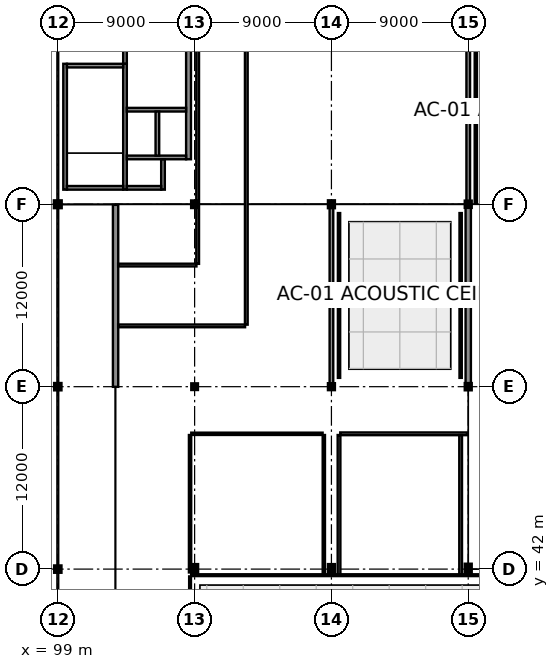
"""IFC4 building model, lengths in metres.
Left out: names, types, materials, properties, quantities, classifications, styles, units other than length and angle.
Written with IfcOpenShell. Run it as: python <this file> out.ifc"""

import sys

from ifc_helpers import new_model, si_unit, direction, frame, frame_2d, origin, origin_2d, place, context, subcontext, project, spatial, rectangle, hollow_circle, i_section, extrude, element, fill, save


model = new_model("IFC4")
c1 = context("Model", 3, precision=1e-05, world=origin(), true_north=direction((0.0, 1.0)))
c2 = subcontext(c1, "Body", "Model", "MODEL_VIEW")
j1 = project(units=[si_unit("LENGTHUNIT", "METRE"), si_unit("PLANEANGLEUNIT", "RADIAN")], contexts=[c1])
p1 = place(None, origin())
s1 = spatial("IfcSite", under=j1, at=p1, CompositionType="ELEMENT")
p2 = place(p1, origin())
s2 = spatial("IfcBuilding", under=s1, at=p2, CompositionType="ELEMENT")
p3 = place(p2, origin())
s3 = spatial("IfcBuildingStorey", under=s2, at=p3, CompositionType="ELEMENT", Elevation=0.0)
for number, where, z_axis, x_axis in (
    (1, (99.0, 42.0, 0.0), (0.0, 0.0, 1.0), (1.0, 0.0, 0.0)),
    (2, (99.0, 54.0, 0.0), (0.0, 0.0, 1.0), (1.0, 0.0, 0.0)),
):
    element("IfcColumn", number, at=place(p3, frame(where, z_axis=z_axis, x_axis=x_axis)), inside=s3, PredefinedType="PILASTER", context=c2, shape_type="SweptSolid", body=[
        extrude(hollow_circle(Radius=0.162, WallThickness=0.012, at=origin_2d()), origin(), (0.0, 0.0, 1.0), 5.4),
    ])
p4 = place(p3, frame((99.0, 66.0, 0.0), z_axis=(0.0, 0.0, 1.0), x_axis=(1.0, 0.0, 0.0)))
e3 = element("IfcColumn", 3, at=p4, inside=s3, PredefinedType="PILASTER", context=c2, shape_type="SweptSolid", body=[
    extrude(hollow_circle(Radius=0.178, WallThickness=0.016, at=origin_2d()), origin(), (0.0, 0.0, 1.0), 5.4),
])
p5 = place(p3, frame((108.0, 42.0, 0.0), z_axis=(0.0, 0.0, 1.0), x_axis=(1.0, 0.0, 0.0)))
e4 = element("IfcColumn", 4, at=p5, inside=s3, PredefinedType="COLUMN", context=c2, shape_type="SweptSolid", body=[
    extrude(i_section(OverallWidth=0.3, OverallDepth=0.5, WebThickness=0.014, FlangeThickness=0.028, at=origin_2d()), origin(), (0.0, 0.0, 1.0), 5.4),
])
p6 = place(p3, frame((108.0, 54.0, 0.0), z_axis=(0.0, 0.0, 1.0), x_axis=(1.0, 0.0, 0.0)))
e5 = element("IfcColumn", 5, at=p6, inside=s3, PredefinedType="COLUMN", context=c2, shape_type="SweptSolid", body=[
    extrude(i_section(OverallWidth=0.28, OverallDepth=0.28, WebThickness=0.01, FlangeThickness=0.018, at=origin_2d()), origin(), (0.0, 0.0, 1.0), 5.4),
])
p7 = place(p3, frame((108.0, 66.0, 0.0), z_axis=(0.0, 0.0, 1.0), x_axis=(1.0, 0.0, 0.0)))
e6 = element("IfcColumn", 6, at=p7, inside=s3, PredefinedType="COLUMN", context=c2, shape_type="SweptSolid", body=[
    extrude(i_section(OverallWidth=0.3, OverallDepth=0.34, WebThickness=0.012, FlangeThickness=0.021, at=origin_2d()), origin(), (0.0, 0.0, 1.0), 5.4),
])
p8 = place(p3, frame((117.0, 42.0, 0.0), z_axis=(0.0, 0.0, 1.0), x_axis=(0.0, 1.0, 0.0)))
e7 = element("IfcColumn", 7, at=p8, inside=s3, PredefinedType="COLUMN", context=c2, shape_type="SweptSolid", body=[
    extrude(i_section(OverallWidth=0.3, OverallDepth=0.5, WebThickness=0.014, FlangeThickness=0.028, at=origin_2d()), origin(), (0.0, 0.0, 1.0), 5.4),
])
p9 = place(p3, frame((117.0, 54.0, 0.0), z_axis=(0.0, 0.0, 1.0), x_axis=(1.0, 0.0, 0.0)))
e8 = element("IfcColumn", 8, at=p9, inside=s3, PredefinedType="COLUMN", context=c2, shape_type="SweptSolid", body=[
    extrude(i_section(OverallWidth=0.3, OverallDepth=0.3, WebThickness=0.011, FlangeThickness=0.019, at=origin_2d()), origin(), (0.0, 0.0, 1.0), 5.4),
])
p10 = place(p3, frame((117.0, 66.0, 0.0), z_axis=(0.0, 0.0, 1.0), x_axis=(1.0, 0.0, 0.0)))
e9 = element("IfcColumn", 9, at=p10, inside=s3, PredefinedType="COLUMN", context=c2, shape_type="SweptSolid", body=[
    extrude(i_section(OverallWidth=0.3, OverallDepth=0.36, WebThickness=0.012, FlangeThickness=0.022, at=origin_2d()), origin(), (0.0, 0.0, 1.0), 5.4),
])
p11 = place(p3, frame((126.0, 42.0, 0.0), z_axis=(0.0, 0.0, 1.0), x_axis=(1.0, 0.0, 0.0)))
e10 = element("IfcColumn", 10, at=p11, inside=s3, PredefinedType="COLUMN", context=c2, shape_type="SweptSolid", body=[
    extrude(i_section(OverallWidth=0.3, OverallDepth=0.55, WebThickness=0.015, FlangeThickness=0.029, at=origin_2d()), origin(), (0.0, 0.0, 1.0), 5.4),
])
for number, where, z_axis, x_axis in (
    (11, (126.0, 54.0, 0.0), (0.0, 0.0, 1.0), (1.0, 0.0, 0.0)),
    (12, (126.0, 66.0, 0.0), (0.0, 0.0, 1.0), (0.0, 1.0, 0.0)),
):
    element("IfcColumn", number, at=place(p3, frame(where, z_axis=z_axis, x_axis=x_axis)), inside=s3, PredefinedType="COLUMN", context=c2, shape_type="SweptSolid", body=[
        extrude(i_section(OverallWidth=0.3, OverallDepth=0.32, WebThickness=0.011, FlangeThickness=0.021, at=origin_2d()), origin(), (0.0, 0.0, 1.0), 5.4),
    ])
p12 = place(p3, frame((126.0, 54.158, 0.0), z_axis=(0.0, 0.0, 1.0), x_axis=(0.0, 1.0, 0.0)))
e13 = element("IfcWall", 13, at=p12, inside=s3, PredefinedType="SOLIDWALL", context=c2, shape_type="SweptSolid", body=[
    extrude(rectangle(XDim=11.834, YDim=0.35, at=frame_2d((5.917, 0.0))), origin(), (0.0, 0.0, 1.0), 4.605),
])
p13 = place(p3, frame((102.8, 65.96, 0.0), z_axis=(0.0, 0.0, 1.0), x_axis=(0.0, -1.0, 0.0)))
e14 = element("IfcWall", 14, at=p13, inside=s3, PredefinedType="SOLIDWALL", context=c2, shape_type="SweptSolid", body=[
    extrude(rectangle(XDim=11.97, YDim=0.35, at=frame_2d((5.985, 0.0))), origin(), (0.0, 0.0, 1.0), 5.08),
])
p14 = place(p13, frame((4.96, 0.0, 0.0)))
e15 = element("IfcOpeningElement", 15, at=p14, cuts=e14, PredefinedType="OPENING", context=c2, shape_type="SweptSolid", body=[
    extrude(rectangle(XDim=2.0, YDim=2.5, at=frame_2d((1.0, 1.25))), frame((0.0, 0.19, 0.0), z_axis=(0.0, -1.0, 0.0), x_axis=(1.0, 0.0, 0.0)), (0.0, 0.0, 1.0), 0.38),
])
p15 = place(p3, frame((99.48, 66.96, 0.0), z_axis=(0.0, 0.0, 1.0), x_axis=(0.0, 1.0, 0.0)))
e16 = element("IfcWall", 16, at=p15, inside=s3, PredefinedType="SHEAR", context=c2, shape_type="SweptSolid", body=[
    extrude(rectangle(XDim=8.28, YDim=0.24, at=frame_2d((4.14, 0.0))), origin(), (0.0, 0.0, 1.0), 5.21),
])
p16 = place(p3, frame((103.42, 66.96, 0.0), z_axis=(0.0, 0.0, 1.0), x_axis=(0.0, 1.0, 0.0)))
e17 = element("IfcWall", 17, at=p16, inside=s3, PredefinedType="SHEAR", context=c2, shape_type="SweptSolid", body=[
    extrude(rectangle(XDim=8.28, YDim=0.24, at=frame_2d((4.14, 0.0))), origin(), (0.0, 0.0, 1.0), 5.21),
])
p17 = place(p16, frame((6.49, 0.0, 0.0)))
e18 = element("IfcOpeningElement", 18, at=p17, cuts=e17, PredefinedType="OPENING", context=c2, shape_type="SweptSolid", body=[
    extrude(rectangle(XDim=1.3, YDim=2.2, at=frame_2d((0.65, 1.1))), frame((0.0, 0.135, 0.0), z_axis=(0.0, -1.0, 0.0), x_axis=(1.0, 0.0, 0.0)), (0.0, 0.0, 1.0), 0.27),
])
for number, where, z_axis, x_axis in (
    (19, (99.6, 67.08, 0.0), (0.0, 0.0, 1.0), (1.0, 0.0, 0.0)),
    (20, (99.6, 75.12, 0.0), (0.0, 0.0, 1.0), (1.0, 0.0, 0.0)),
):
    element("IfcWall", number, at=place(p3, frame(where, z_axis=z_axis, x_axis=x_axis)), inside=s3, PredefinedType="SHEAR", context=c2, shape_type="SweptSolid", body=[
        extrude(rectangle(XDim=3.7, YDim=0.24, at=frame_2d((1.85, 0.0))), origin(), (0.0, 0.0, 1.0), 5.21),
    ])
p18 = place(p3, frame((103.42, 75.24, 0.0), z_axis=(0.0, 0.0, 1.0), x_axis=(0.0, 1.0, 0.0)))
e21 = element("IfcWall", 21, at=p18, inside=s3, PredefinedType="SHEAR", context=c2, shape_type="SweptSolid", body=[
    extrude(rectangle(XDim=2.76, YDim=0.24, at=frame_2d((1.38, 0.0))), origin(), (0.0, 0.0, 1.0), 5.06),
])
p19 = place(p3, frame((107.6, 68.96, 0.0), z_axis=(0.0, 0.0, 1.0), x_axis=(0.0, 1.0, 0.0)))
e22 = element("IfcWall", 22, at=p19, inside=s3, PredefinedType="SHEAR", context=c2, shape_type="SweptSolid", body=[
    extrude(rectangle(XDim=9.04, YDim=0.32, at=frame_2d((4.52, 0.0))), origin(), (0.0, 0.0, 1.0), 5.06),
])
p20 = place(p3, frame((103.54, 72.22, 0.0), z_axis=(0.0, 0.0, 1.0), x_axis=(1.0, 0.0, 0.0)))
e23 = element("IfcWall", 23, at=p20, inside=s3, PredefinedType="SHEAR", context=c2, shape_type="SweptSolid", body=[
    extrude(rectangle(XDim=3.9, YDim=0.24, at=frame_2d((1.95, 0.0))), origin(), (0.0, 0.0, 1.0), 5.21),
])
p21 = place(p20, frame((0.385, 0.0, 0.0)))
e24 = element("IfcOpeningElement", 24, at=p21, cuts=e23, PredefinedType="OPENING", context=c2, shape_type="SweptSolid", body=[
    extrude(rectangle(XDim=1.3, YDim=2.2, at=frame_2d((0.65, 1.1))), frame((0.0, 0.135, 0.0), z_axis=(0.0, -1.0, 0.0), x_axis=(1.0, 0.0, 0.0)), (0.0, 0.0, 1.0), 0.27),
])
p22 = place(p20, frame((2.335, 0.0, 0.0)))
e25 = element("IfcOpeningElement", 25, at=p22, cuts=e23, PredefinedType="OPENING", context=c2, shape_type="SweptSolid", body=[
    extrude(rectangle(XDim=1.3, YDim=2.2, at=frame_2d((0.65, 1.1))), frame((0.0, 0.135, 0.0), z_axis=(0.0, -1.0, 0.0), x_axis=(1.0, 0.0, 0.0)), (0.0, 0.0, 1.0), 0.27),
])
p23 = place(p3, frame((103.54, 69.08, 0.0), z_axis=(0.0, 0.0, 1.0), x_axis=(1.0, 0.0, 0.0)))
e26 = element("IfcWall", 26, at=p23, inside=s3, PredefinedType="SHEAR", context=c2, shape_type="SweptSolid", body=[
    extrude(rectangle(XDim=3.9, YDim=0.24, at=frame_2d((1.95, 0.0))), origin(), (0.0, 0.0, 1.0), 5.21),
])
p24 = place(p3, frame((105.55, 69.2, 0.0), z_axis=(0.0, 0.0, 1.0), x_axis=(0.0, 1.0, 0.0)))
e27 = element("IfcWall", 27, at=p24, inside=s3, PredefinedType="SHEAR", context=c2, shape_type="SweptSolid", body=[
    extrude(rectangle(XDim=2.9, YDim=0.24, at=frame_2d((1.45, 0.0))), origin(), (0.0, 0.0, 1.0), 5.21),
])
p25 = place(p3, frame((105.92, 66.96, 0.0), z_axis=(0.0, 0.0, 1.0), x_axis=(0.0, 1.0, 0.0)))
e28 = element("IfcWall", 28, at=p25, inside=s3, PredefinedType="SHEAR", context=c2, shape_type="SweptSolid", body=[
    extrude(rectangle(XDim=2.0, YDim=0.24, at=frame_2d((1.0, 0.0))), origin(), (0.0, 0.0, 1.0), 5.21),
])
p26 = place(p3, frame((103.54, 67.08, 0.0), z_axis=(0.0, 0.0, 1.0), x_axis=(1.0, 0.0, 0.0)))
e29 = element("IfcWall", 29, at=p26, inside=s3, PredefinedType="SHEAR", context=c2, shape_type="SweptSolid", body=[
    extrude(rectangle(XDim=2.26, YDim=0.24, at=frame_2d((1.13, 0.0))), origin(), (0.0, 0.0, 1.0), 5.21),
])
p27 = place(p3, frame((126.0, 66.008, 0.0), z_axis=(0.0, 0.0, 1.0), x_axis=(0.0, 1.0, 0.0)))
e30 = element("IfcWall", 30, at=p27, inside=s3, PredefinedType="SHEAR", context=c2, shape_type="SweptSolid", body=[
    extrude(rectangle(XDim=11.669, YDim=0.24, at=frame_2d((5.834, 0.0))), origin(), (0.0, 0.0, 1.0), 4.605),
])
p28 = place(p3, frame((117.0, 54.148, 0.0), z_axis=(0.0, 0.0, 1.0), x_axis=(0.0, 1.0, 0.0)))
e31 = element("IfcWall", 31, at=p28, inside=s3, PredefinedType="SHEAR", context=c2, shape_type="SweptSolid", body=[
    extrude(rectangle(XDim=11.674, YDim=0.24, at=frame_2d((5.837, 0.0))), origin(), (0.0, 0.0, 1.0), 4.675),
])
p29 = place(p3, frame((111.4, 81.72, 0.0), z_axis=(0.0, 0.0, 1.0), x_axis=(0.0, -1.0, 0.0)))
e32 = element("IfcWall", 32, at=p29, inside=s3, PredefinedType="PARTITIONING", context=c2, shape_type="SweptSolid", body=[
    extrude(rectangle(XDim=23.64, YDim=0.18, at=frame_2d((11.82, 0.0))), origin(), (0.0, 0.0, 1.0), 5.04),
])
p30 = place(p29, frame((11.095, 0.0, 0.0)))
e33 = element("IfcOpeningElement", 33, at=p30, cuts=e32, PredefinedType="OPENING", context=c2, shape_type="SweptSolid", body=[
    extrude(rectangle(XDim=1.45, YDim=2.2, at=frame_2d((0.725, 1.1))), frame((0.0, 0.105, 0.0), z_axis=(0.0, -1.0, 0.0), x_axis=(1.0, 0.0, 0.0)), (0.0, 0.0, 1.0), 0.21),
])
p31 = place(p3, frame((111.32, 58.0, 0.0), z_axis=(0.0, 0.0, 1.0), x_axis=(-1.0, 0.0, 0.0)))
e34 = element("IfcWall", 34, at=p31, inside=s3, PredefinedType="PARTITIONING", context=c2, shape_type="SweptSolid", body=[
    extrude(rectangle(XDim=8.35, YDim=0.18, at=frame_2d((4.175, 0.0))), origin(), (0.0, 0.0, 1.0), 5.04),
])
p32 = place(p31, frame((3.45, 0.0, 0.0)))
e35 = element("IfcOpeningElement", 35, at=p32, cuts=e34, PredefinedType="OPENING", context=c2, shape_type="SweptSolid", body=[
    extrude(rectangle(XDim=1.45, YDim=2.2, at=frame_2d((0.725, 1.1))), frame((0.0, 0.105, 0.0), z_axis=(0.0, -1.0, 0.0), x_axis=(1.0, 0.0, 0.0)), (0.0, 0.0, 1.0), 0.21),
])
p33 = place(p3, frame((102.97, 62.0, 0.0), z_axis=(0.0, 0.0, 1.0), x_axis=(1.0, 0.0, 0.0)))
e36 = element("IfcWall", 36, at=p33, inside=s3, PredefinedType="PARTITIONING", context=c2, shape_type="SweptSolid", body=[
    extrude(rectangle(XDim=5.15, YDim=0.18, at=frame_2d((2.575, 0.0))), origin(), (0.0, 0.0, 1.0), 5.04),
])
p34 = place(p3, frame((108.2, 62.08, 0.0), z_axis=(0.0, 0.0, 1.0), x_axis=(0.0, 1.0, 0.0)))
e37 = element("IfcWall", 37, at=p34, inside=s3, PredefinedType="PARTITIONING", context=c2, shape_type="SweptSolid", body=[
    extrude(rectangle(XDim=15.84, YDim=0.18, at=frame_2d((7.92, 0.0))), origin(), (0.0, 0.0, 1.0), 4.705),
])
p35 = place(p3, frame((126.5, 66.075, 0.0), z_axis=(0.0, 0.0, 1.0), x_axis=(0.0, 1.0, 0.0)))
e38 = element("IfcWall", 38, at=p35, inside=s3, PredefinedType="PARTITIONING", context=c2, shape_type="SweptSolid", body=[
    extrude(rectangle(XDim=11.745, YDim=0.15, at=frame_2d((5.873, 0.0))), origin(), (0.0, 0.0, 1.0), 5.04),
])
p36 = place(p3, frame((107.7, 24.48, 0.0), z_axis=(0.0, 0.0, 1.0), x_axis=(0.0, 1.0, 0.0)))
e39 = element("IfcWall", 39, at=p36, inside=s3, PredefinedType="PARTITIONING", context=c2, shape_type="SweptSolid", body=[
    extrude(rectangle(XDim=17.04, YDim=0.12, at=frame_2d((8.52, 0.0))), origin(), (0.0, 0.0, 1.0), 5.04),
])
p37 = place(p36, frame((8.07, 0.0, 0.0)))
e40 = element("IfcOpeningElement", 40, at=p37, cuts=e39, PredefinedType="OPENING", context=c2, shape_type="SweptSolid", body=[
    extrude(rectangle(XDim=0.9, YDim=2.1, at=frame_2d((0.45, 1.05))), frame((0.0, 0.075, 0.0), z_axis=(0.0, -1.0, 0.0), x_axis=(1.0, 0.0, 0.0)), (0.0, 0.0, 1.0), 0.15),
])
p38 = place(p36, frame((14.09, 0.0, 1.05)))
e41 = element("IfcOpeningElement", 41, at=p38, cuts=e39, PredefinedType="OPENING", context=c2, shape_type="SweptSolid", body=[
    extrude(rectangle(XDim=2.1, YDim=1.2, at=frame_2d((1.05, 0.6))), frame((0.0, 0.075, 0.0), z_axis=(0.0, -1.0, 0.0), x_axis=(1.0, 0.0, 0.0)), (0.0, 0.0, 1.0), 0.15),
])
p39 = place(p3, frame((107.78, 41.6, 0.0), z_axis=(0.0, 0.0, 1.0), x_axis=(1.0, 0.0, 0.0)))
e42 = element("IfcWall", 42, at=p39, inside=s3, PredefinedType="PARTITIONING", context=c2, shape_type="SweptSolid", body=[
    extrude(rectangle(XDim=36.212, YDim=0.12, at=frame_2d((18.106, 0.0))), origin(), (0.0, 0.0, 1.0), 5.04),
])
p40 = place(p3, frame((107.78, 50.9, 0.0), z_axis=(0.0, 0.0, 1.0), x_axis=(1.0, 0.0, 0.0)))
e43 = element("IfcWall", 43, at=p40, inside=s3, PredefinedType="PARTITIONING", context=c2, shape_type="SweptSolid", body=[
    extrude(rectangle(XDim=8.64, YDim=0.15, at=frame_2d((4.32, 0.0))), origin(), (0.0, 0.0, 1.0), 5.04),
])
p41 = place(p3, frame((116.5, 50.82, 0.0), z_axis=(0.0, 0.0, 1.0), x_axis=(0.0, -1.0, 0.0)))
e44 = element("IfcWall", 44, at=p41, inside=s3, PredefinedType="PARTITIONING", context=c2, shape_type="SweptSolid", body=[
    extrude(rectangle(XDim=9.165, YDim=0.15, at=frame_2d((4.583, 0.0))), origin(), (0.0, 0.0, 1.0), 5.04),
])
p42 = place(p3, frame((107.7, 41.78, 0.0), z_axis=(0.0, 0.0, 1.0), x_axis=(0.0, 1.0, 0.0)))
e45 = element("IfcWall", 45, at=p42, inside=s3, PredefinedType="PARTITIONING", context=c2, shape_type="SweptSolid", body=[
    extrude(rectangle(XDim=9.04, YDim=0.15, at=frame_2d((4.52, 0.0))), origin(), (0.0, 0.0, 1.0), 5.04),
])
p43 = place(p42, frame((3.995, 0.0, 0.0)))
e46 = element("IfcOpeningElement", 46, at=p43, cuts=e45, PredefinedType="OPENING", context=c2, shape_type="SweptSolid", body=[
    extrude(rectangle(XDim=1.05, YDim=2.25, at=frame_2d((0.525, 1.125))), frame((0.0, 0.09, 0.0), z_axis=(0.0, -1.0, 0.0), x_axis=(1.0, 0.0, 0.0)), (0.0, 0.0, 1.0), 0.18),
])
p44 = place(p42, frame((6.39, 0.0, 1.05)))
e47 = element("IfcOpeningElement", 47, at=p44, cuts=e45, PredefinedType="OPENING", context=c2, shape_type="SweptSolid", body=[
    extrude(rectangle(XDim=1.8, YDim=1.1, at=frame_2d((0.9, 0.55))), frame((0.0, 0.09, 0.0), z_axis=(0.0, -1.0, 0.0), x_axis=(1.0, 0.0, 0.0)), (0.0, 0.0, 1.0), 0.18),
])
p45 = place(p3, frame((117.5, 41.655, 0.0), z_axis=(0.0, 0.0, 1.0), x_axis=(0.0, 1.0, 0.0)))
e48 = element("IfcWall", 48, at=p45, inside=s3, PredefinedType="PARTITIONING", context=c2, shape_type="SweptSolid", body=[
    extrude(rectangle(XDim=9.165, YDim=0.18, at=frame_2d((4.583, 0.0))), origin(), (0.0, 0.0, 1.0), 5.04),
])
p46 = place(p3, frame((117.58, 50.9, 0.0), z_axis=(0.0, 0.0, 1.0), x_axis=(1.0, 0.0, 0.0)))
e49 = element("IfcWall", 49, at=p46, inside=s3, PredefinedType="PARTITIONING", context=c2, shape_type="SweptSolid", body=[
    extrude(rectangle(XDim=8.345, YDim=0.18, at=frame_2d((4.172, 0.0))), origin(), (0.0, 0.0, 1.0), 5.04),
])
p47 = place(p46, frame((3.597, 0.0, 0.0)))
e50 = element("IfcOpeningElement", 50, at=p47, cuts=e49, PredefinedType="OPENING", context=c2, shape_type="SweptSolid", body=[
    extrude(rectangle(XDim=1.15, YDim=2.15, at=frame_2d((0.575, 1.075))), frame((0.0, 0.105, 0.0), z_axis=(0.0, -1.0, 0.0), x_axis=(1.0, 0.0, 0.0)), (0.0, 0.0, 1.0), 0.21),
])
p48 = place(p46, frame((5.995, 0.0, 1.05)))
e51 = element("IfcOpeningElement", 51, at=p48, cuts=e49, PredefinedType="OPENING", context=c2, shape_type="SweptSolid", body=[
    extrude(rectangle(XDim=1.5, YDim=1.1, at=frame_2d((0.75, 0.55))), frame((0.0, 0.105, 0.0), z_axis=(0.0, -1.0, 0.0), x_axis=(1.0, 0.0, 0.0)), (0.0, 0.0, 1.0), 0.21),
])
p49 = place(p3, frame((125.5, 50.82, 0.0), z_axis=(0.0, 0.0, 1.0), x_axis=(0.0, -1.0, 0.0)))
e52 = element("IfcWall", 52, at=p49, inside=s3, PredefinedType="PARTITIONING", context=c2, shape_type="SweptSolid", body=[
    extrude(rectangle(XDim=9.165, YDim=0.18, at=frame_2d((4.583, 0.0))), origin(), (0.0, 0.0, 1.0), 5.04),
])
for number, where, z_axis, x_axis in (
    (53, (117.5, 54.58, 0.0), (0.0, 0.0, 1.0), (0.0, 1.0, 0.0)),
    (54, (125.5, 65.42, 0.0), (0.0, 0.0, 1.0), (0.0, -1.0, 0.0)),
):
    element("IfcWall", number, at=place(p3, frame(where, z_axis=z_axis, x_axis=x_axis)), inside=s3, PredefinedType="PARTITIONING", context=c2, shape_type="SweptSolid", body=[
        extrude(rectangle(XDim=10.84, YDim=0.15, at=frame_2d((5.42, 0.0))), origin(), (0.0, 0.0, 1.0), 5.04),
    ])
p50 = place(p14, frame((2.0, 0.0, 0.0), z_axis=(0.0, 0.0, 1.0), x_axis=(-1.0, 0.0, 0.0)))
e55 = element("IfcDoor", 55, at=p50, inside=s3, OperationType="DOUBLE_DOOR_SINGLE_SWING", PredefinedType="DOOR", context=c2, shape_type="SweptSolid", body=[
    extrude(rectangle(XDim=2.0, YDim=2.5, at=frame_2d((1.0, 1.25))), frame((0.0, 0.025, 0.0), z_axis=(0.0, -1.0, 0.0), x_axis=(1.0, 0.0, 0.0)), (0.0, 0.0, 1.0), 0.05),
])
fill(e15, e55)
p51 = place(p17, frame((1.3, 0.0, 0.0), z_axis=(0.0, 0.0, 1.0), x_axis=(-1.0, 0.0, 0.0)))
e56 = element("IfcDoor", 56, at=p51, inside=s3, OperationType="SINGLE_SWING_LEFT", PredefinedType="DOOR", context=c2, shape_type="SweptSolid", body=[
    extrude(rectangle(XDim=1.3, YDim=2.2, at=frame_2d((0.65, 1.1))), frame((0.0, 0.025, 0.0), z_axis=(0.0, -1.0, 0.0), x_axis=(1.0, 0.0, 0.0)), (0.0, 0.0, 1.0), 0.05),
])
fill(e18, e56)
p52 = place(p21, origin())
e57 = element("IfcDoor", 57, at=p52, inside=s3, OperationType="DOUBLE_DOOR_SLIDING", PredefinedType="DOOR", context=c2, shape_type="SweptSolid", body=[
    extrude(rectangle(XDim=1.3, YDim=2.2, at=frame_2d((0.65, 1.1))), frame((0.0, 0.025, 0.0), z_axis=(0.0, -1.0, 0.0), x_axis=(1.0, 0.0, 0.0)), (0.0, 0.0, 1.0), 0.05),
])
fill(e24, e57)
p53 = place(p22, origin())
e58 = element("IfcDoor", 58, at=p53, inside=s3, OperationType="DOUBLE_DOOR_SLIDING", PredefinedType="DOOR", context=c2, shape_type="SweptSolid", body=[
    extrude(rectangle(XDim=1.3, YDim=2.2, at=frame_2d((0.65, 1.1))), frame((0.0, 0.025, 0.0), z_axis=(0.0, -1.0, 0.0), x_axis=(1.0, 0.0, 0.0)), (0.0, 0.0, 1.0), 0.05),
])
fill(e25, e58)
p54 = place(p30, origin())
e59 = element("IfcDoor", 59, at=p54, inside=s3, OperationType="DOUBLE_DOOR_SINGLE_SWING", PredefinedType="DOOR", context=c2, shape_type="SweptSolid", body=[
    extrude(rectangle(XDim=1.45, YDim=2.2, at=frame_2d((0.725, 1.1))), frame((0.0, 0.025, 0.0), z_axis=(0.0, -1.0, 0.0), x_axis=(1.0, 0.0, 0.0)), (0.0, 0.0, 1.0), 0.05),
])
fill(e33, e59)
p55 = place(p32, origin())
e60 = element("IfcDoor", 60, at=p55, inside=s3, OperationType="DOUBLE_DOOR_SINGLE_SWING", PredefinedType="DOOR", context=c2, shape_type="SweptSolid", body=[
    extrude(rectangle(XDim=1.45, YDim=2.2, at=frame_2d((0.725, 1.1))), frame((0.0, 0.025, 0.0), z_axis=(0.0, -1.0, 0.0), x_axis=(1.0, 0.0, 0.0)), (0.0, 0.0, 1.0), 0.05),
])
fill(e35, e60)
p56 = place(p43, frame((1.05, 0.0, 0.0), z_axis=(0.0, 0.0, 1.0), x_axis=(-1.0, 0.0, 0.0)))
e61 = element("IfcDoor", 61, at=p56, inside=s3, OperationType="SINGLE_SWING_RIGHT", PredefinedType="DOOR", context=c2, shape_type="SweptSolid", body=[
    extrude(rectangle(XDim=1.05, YDim=2.25, at=frame_2d((0.525, 1.125))), frame((0.0, 0.025, 0.0), z_axis=(0.0, -1.0, 0.0), x_axis=(1.0, 0.0, 0.0)), (0.0, 0.0, 1.0), 0.05),
])
fill(e46, e61)
p57 = place(p44, origin())
e62 = element("IfcWindow", 62, at=p57, inside=s3, PartitioningType="SINGLE_PANEL", PredefinedType="WINDOW", context=c2, shape_type="SweptSolid", body=[
    extrude(rectangle(XDim=1.8, YDim=1.1, at=frame_2d((0.9, 0.55))), frame((0.0, 0.03, 0.0), z_axis=(0.0, -1.0, 0.0), x_axis=(1.0, 0.0, 0.0)), (0.0, 0.0, 1.0), 0.06),
])
fill(e47, e62)
p58 = place(p47, origin())
e63 = element("IfcDoor", 63, at=p58, inside=s3, OperationType="SINGLE_SWING_LEFT", PredefinedType="DOOR", context=c2, shape_type="SweptSolid", body=[
    extrude(rectangle(XDim=1.15, YDim=2.15, at=frame_2d((0.575, 1.075))), frame((0.0, 0.025, 0.0), z_axis=(0.0, -1.0, 0.0), x_axis=(1.0, 0.0, 0.0)), (0.0, 0.0, 1.0), 0.05),
])
fill(e50, e63)
p59 = place(p48, origin())
e64 = element("IfcWindow", 64, at=p59, inside=s3, PartitioningType="SINGLE_PANEL", PredefinedType="WINDOW", context=c2, shape_type="SweptSolid", body=[
    extrude(rectangle(XDim=1.5, YDim=1.1, at=frame_2d((0.75, 0.55))), frame((0.0, 0.03, 0.0), z_axis=(0.0, -1.0, 0.0), x_axis=(1.0, 0.0, 0.0)), (0.0, 0.0, 1.0), 0.06),
])
fill(e51, e64)
save(model, sys.argv[1])
